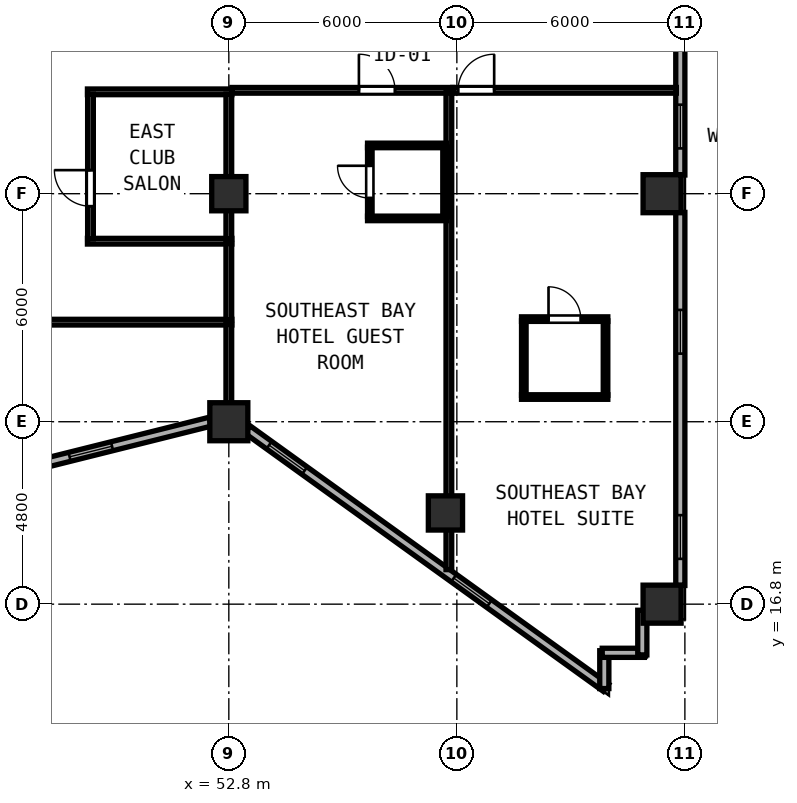
"""IFC4 building model, lengths in metres.
Left out: names, types, materials, properties, quantities, classifications, styles, units other than length and angle.
Written with IfcOpenShell. Run it as: python <this file> out.ifc"""

import sys

from ifc_helpers import new_model, si_unit, direction, frame, frame_2d, origin, origin_2d, place, context, subcontext, project, spatial, rectangle, hollow_rectangle, extrude, element, fill, save


model = new_model("IFC4")
c1 = context("Model", 3, precision=1e-05, world=origin(), true_north=direction((0.0, 1.0)))
c2 = subcontext(c1, "Body", "Model", "MODEL_VIEW")
j1 = project(units=[si_unit("LENGTHUNIT", "METRE"), si_unit("PLANEANGLEUNIT", "RADIAN")], contexts=[c1])
p1 = place(None, origin())
s1 = spatial("IfcSite", under=j1, at=p1, CompositionType="ELEMENT")
p2 = place(p1, origin())
s2 = spatial("IfcBuilding", under=s1, at=p2, CompositionType="ELEMENT")
p3 = place(p2, frame((0.0, 0.0, 98.4)))
s3 = spatial("IfcBuildingStorey", under=s2, at=p3, CompositionType="ELEMENT", Elevation=98.4)
for number, where, z_axis, x_axis in (
    (1, (52.8, 21.6, 0.0), (0.0, 0.0, 1.0), (1.0, 0.0, 0.0)),
    (2, (64.2, 16.8, 0.0), (0.0, 0.0, 1.0), (1.0, 0.0, 0.0)),
    (3, (64.2, 27.6, 0.0), (0.0, 0.0, 1.0), (1.0, 0.0, 0.0)),
):
    element("IfcColumn", number, at=place(p3, frame(where, z_axis=z_axis, x_axis=x_axis)), inside=s3, PredefinedType="COLUMN", context=c2, shape_type="SweptSolid", body=[
        extrude(hollow_rectangle(XDim=1.0, YDim=1.0, WallThickness=0.038, at=origin_2d()), origin(), (0.0, 0.0, 1.0), 3.8),
    ])
for number, where, z_axis, x_axis in (
    (4, (52.8, 27.6, 0.0), (0.0, 0.0, 1.0), (1.0, 0.0, 0.0)),
    (5, (58.5, 19.2, 0.0), (0.0, 0.0, 1.0), (1.0, 0.0, 0.0)),
):
    element("IfcColumn", number, at=place(p3, frame(where, z_axis=z_axis, x_axis=x_axis)), inside=s3, PredefinedType="COLUMN", context=c2, shape_type="SweptSolid", body=[
        extrude(hollow_rectangle(XDim=0.9, YDim=0.9, WallThickness=0.034, at=origin_2d()), origin(), (0.0, 0.0, 1.0), 3.8),
    ])
p4 = place(p3, frame((47.932, 20.507, 0.0), z_axis=(0.0, 0.0, 1.0), x_axis=(0.970145683738, 0.242522890311, 0.0)))
e6 = element("IfcWall", 6, at=p4, inside=s3, PredefinedType="SOLIDWALL", context=c2, shape_type="SweptSolid", body=[
    extrude(rectangle(XDim=4.511, YDim=0.24, at=frame_2d((2.255, 0.0))), origin(), (0.0, 0.0, 1.0), 3.145),
])
p5 = place(p4, frame((0.7, 0.0, 0.85)))
e7 = element("IfcOpeningElement", 7, at=p5, cuts=e6, PredefinedType="OPENING", context=c2, shape_type="SweptSolid", body=[
    extrude(rectangle(XDim=1.15, YDim=1.8, at=frame_2d((0.575, 0.9))), frame((0.0, 0.13, 0.0), z_axis=(0.0, -1.0, 0.0), x_axis=(1.0, 0.0, 0.0)), (0.0, 0.0, 1.0), 0.26),
])
p6 = place(p3, frame((53.292, 21.394, 0.0), z_axis=(0.0, 0.0, 1.0), x_axis=(0.811543504691, -0.584291998913, 0.0)))
e8 = element("IfcWall", 8, at=p6, inside=s3, PredefinedType="SOLIDWALL", context=c2, shape_type="SweptSolid", body=[
    extrude(rectangle(XDim=11.623, YDim=0.24, at=frame_2d((5.812, 0.0))), origin(), (0.0, 0.0, 1.0), 3.145),
])
p7 = place(p6, frame((0.7, 0.0, 0.85)))
e9 = element("IfcOpeningElement", 9, at=p7, cuts=e8, PredefinedType="OPENING", context=c2, shape_type="SweptSolid", body=[
    extrude(rectangle(XDim=1.15, YDim=1.8, at=frame_2d((0.575, 0.9))), frame((0.0, 0.13, 0.0), z_axis=(0.0, -1.0, 0.0), x_axis=(1.0, 0.0, 0.0)), (0.0, 0.0, 1.0), 0.26),
])
p8 = place(p6, frame((6.688, 0.0, 0.85)))
e10 = element("IfcOpeningElement", 10, at=p8, cuts=e8, PredefinedType="OPENING", context=c2, shape_type="SweptSolid", body=[
    extrude(rectangle(XDim=1.15, YDim=1.8, at=frame_2d((0.575, 0.9))), frame((0.0, 0.13, 0.0), z_axis=(0.0, -1.0, 0.0), x_axis=(1.0, 0.0, 0.0)), (0.0, 0.0, 1.0), 0.26),
])
p9 = place(p3, frame((62.68, 14.579, 0.0), z_axis=(0.0, 0.0, 1.0), x_axis=(0.0, 1.0, 0.0)))
e11 = element("IfcWall", 11, at=p9, inside=s3, PredefinedType="SOLIDWALL", context=c2, shape_type="SweptSolid", body=[
    extrude(rectangle(XDim=0.996, YDim=0.24, at=frame_2d((0.498, 0.0))), origin(), (0.0, 0.0, 1.0), 3.6),
])
p10 = place(p3, frame((62.625, 15.52, 0.0), z_axis=(0.0, 0.0, 1.0), x_axis=(1.0, 0.0, 0.0)))
e12 = element("IfcWall", 12, at=p10, inside=s3, PredefinedType="SOLIDWALL", context=c2, shape_type="SweptSolid", body=[
    extrude(rectangle(XDim=1.11, YDim=0.24, at=frame_2d((0.555, 0.0))), origin(), (0.0, 0.0, 1.0), 3.6),
])
p11 = place(p3, frame((63.68, 15.465, 0.0), z_axis=(0.0, 0.0, 1.0), x_axis=(0.0, 1.0, 0.0)))
e13 = element("IfcWall", 13, at=p11, inside=s3, PredefinedType="SOLIDWALL", context=c2, shape_type="SweptSolid", body=[
    extrude(rectangle(XDim=1.175, YDim=0.24, at=frame_2d((0.587, 0.0))), origin(), (0.0, 0.0, 1.0), 3.6),
])
p12 = place(p3, frame((64.68, 17.292, 0.0), z_axis=(0.0, 0.0, 1.0), x_axis=(0.0, 1.0, 0.0)))
e14 = element("IfcWall", 14, at=p12, inside=s3, PredefinedType="SOLIDWALL", context=c2, shape_type="SweptSolid", body=[
    extrude(rectangle(XDim=9.816, YDim=0.24, at=frame_2d((4.908, 0.0))), origin(), (0.0, 0.0, 1.0), 3.6),
])
p13 = place(p12, frame((0.7, 0.0, 0.85)))
e15 = element("IfcOpeningElement", 15, at=p13, cuts=e14, PredefinedType="OPENING", context=c2, shape_type="SweptSolid", body=[
    extrude(rectangle(XDim=1.15, YDim=1.8, at=frame_2d((0.575, 0.9))), frame((0.0, 0.13, 0.0), z_axis=(0.0, -1.0, 0.0), x_axis=(1.0, 0.0, 0.0)), (0.0, 0.0, 1.0), 0.26),
])
p14 = place(p12, frame((6.1, 0.0, 0.85)))
e16 = element("IfcOpeningElement", 16, at=p14, cuts=e14, PredefinedType="OPENING", context=c2, shape_type="SweptSolid", body=[
    extrude(rectangle(XDim=1.15, YDim=1.8, at=frame_2d((0.575, 0.9))), frame((0.0, 0.13, 0.0), z_axis=(0.0, -1.0, 0.0), x_axis=(1.0, 0.0, 0.0)), (0.0, 0.0, 1.0), 0.26),
])
p15 = place(p3, frame((64.68, 28.092, 0.0), z_axis=(0.0, 0.0, 1.0), x_axis=(0.0, 1.0, 0.0)))
e17 = element("IfcWall", 17, at=p15, inside=s3, PredefinedType="SOLIDWALL", context=c2, shape_type="SweptSolid", body=[
    extrude(rectangle(XDim=9.443, YDim=0.24, at=frame_2d((4.721, 0.0))), origin(), (0.0, 0.0, 1.0), 3.6),
])
p16 = place(p15, frame((0.7, 0.0, 0.85)))
e18 = element("IfcOpeningElement", 18, at=p16, cuts=e17, PredefinedType="OPENING", context=c2, shape_type="SweptSolid", body=[
    extrude(rectangle(XDim=1.15, YDim=1.8, at=frame_2d((0.575, 0.9))), frame((0.0, 0.13, 0.0), z_axis=(0.0, -1.0, 0.0), x_axis=(1.0, 0.0, 0.0)), (0.0, 0.0, 1.0), 0.26),
])
p17 = place(p15, frame((6.1, 0.0, 0.85)))
e19 = element("IfcOpeningElement", 19, at=p17, cuts=e17, PredefinedType="OPENING", context=c2, shape_type="SweptSolid", body=[
    extrude(rectangle(XDim=1.15, YDim=1.8, at=frame_2d((0.575, 0.9))), frame((0.0, 0.13, 0.0), z_axis=(0.0, -1.0, 0.0), x_axis=(1.0, 0.0, 0.0)), (0.0, 0.0, 1.0), 0.26),
])
for number, where, z_axis, x_axis in (
    (20, (49.08, 30.28, 0.0), (0.0, 0.0, 1.0), (1.0, 0.0, 0.0)),
    (21, (49.08, 26.35, 0.0), (0.0, 0.0, 1.0), (1.0, 0.0, 0.0)),
):
    element("IfcWall", number, at=place(p3, frame(where, z_axis=z_axis, x_axis=x_axis)), inside=s3, PredefinedType="PARTITIONING", context=c2, shape_type="SweptSolid", body=[
        extrude(rectangle(XDim=3.8, YDim=0.15, at=frame_2d((1.9, 0.0))), origin(), (0.0, 0.0, 1.0), 3.6),
    ])
p18 = place(p3, frame((49.16, 26.41, 0.0), z_axis=(0.0, 0.0, 1.0), x_axis=(0.0, 1.0, 0.0)))
e22 = element("IfcWall", 22, at=p18, inside=s3, PredefinedType="PARTITIONING", context=c2, shape_type="SweptSolid", body=[
    extrude(rectangle(XDim=3.81, YDim=0.15, at=frame_2d((1.905, 0.0))), origin(), (0.0, 0.0, 1.0), 3.6),
])
p19 = place(p18, frame((0.86, 0.0, 0.0)))
e23 = element("IfcOpeningElement", 23, at=p19, cuts=e22, PredefinedType="OPENING", context=c2, shape_type="SweptSolid", body=[
    extrude(rectangle(XDim=0.95, YDim=2.12, at=frame_2d((0.475, 1.06))), frame((0.0, 0.085, 0.0), z_axis=(0.0, -1.0, 0.0), x_axis=(1.0, 0.0, 0.0)), (0.0, 0.0, 1.0), 0.17),
])
p20 = place(p3, frame((52.8, 26.41, 0.0), z_axis=(0.0, 0.0, 1.0), x_axis=(0.0, 1.0, 0.0)))
e24 = element("IfcWall", 24, at=p20, inside=s3, PredefinedType="PARTITIONING", context=c2, shape_type="SweptSolid", body=[
    extrude(rectangle(XDim=3.81, YDim=0.15, at=frame_2d((1.905, 0.0))), origin(), (0.0, 0.0, 1.0), 3.145),
])
p21 = place(p3, frame((45.682, 24.22, 0.0), z_axis=(0.0, 0.0, 1.0), x_axis=(1.0, 0.0, 0.0)))
e25 = element("IfcWall", 25, at=p21, inside=s3, PredefinedType="PARTITIONING", context=c2, shape_type="SweptSolid", body=[
    extrude(rectangle(XDim=7.198, YDim=0.15, at=frame_2d((3.599, 0.0))), origin(), (0.0, 0.0, 1.0), 3.6),
])
p22 = place(p21, frame((2.143, 0.0, 0.0), z_axis=(0.0, 0.0, 1.0), x_axis=(-1.0, 0.0, 0.0)))
e26 = element("IfcOpeningElement", 26, at=p22, cuts=e25, PredefinedType="OPENING", context=c2, shape_type="SweptSolid", body=[
    extrude(rectangle(XDim=0.95, YDim=2.12, at=frame_2d((0.475, 1.06))), frame((0.0, 0.085, 0.0), z_axis=(0.0, -1.0, 0.0), x_axis=(1.0, 0.0, 0.0)), (0.0, 0.0, 1.0), 0.17),
])
p23 = place(p3, frame((52.8, 21.819, 0.0), z_axis=(0.0, 0.0, 1.0), x_axis=(0.0, 1.0, 0.0)))
e27 = element("IfcWall", 27, at=p23, inside=s3, PredefinedType="PARTITIONING", context=c2, shape_type="SweptSolid", body=[
    extrude(rectangle(XDim=2.341, YDim=0.15, at=frame_2d((1.171, 0.0))), origin(), (0.0, 0.0, 1.0), 3.145),
])
p24 = place(p3, frame((52.882, 30.32, 0.0), z_axis=(0.0, 0.0, 1.0), x_axis=(1.0, 0.0, 0.0)))
e28 = element("IfcWall", 28, at=p24, inside=s3, PredefinedType="PARTITIONING", context=c2, shape_type="SweptSolid", body=[
    extrude(rectangle(XDim=5.808, YDim=0.15, at=frame_2d((2.904, 0.0))), origin(), (0.0, 0.0, 1.0), 3.6),
])
p25 = place(p24, frame((4.291, 0.0, 0.0), z_axis=(0.0, 0.0, 1.0), x_axis=(-1.0, 0.0, 0.0)))
e29 = element("IfcOpeningElement", 29, at=p25, cuts=e28, PredefinedType="OPENING", context=c2, shape_type="SweptSolid", body=[
    extrude(rectangle(XDim=0.95, YDim=2.15, at=frame_2d((0.475, 1.075))), frame((0.0, 0.085, 0.0), z_axis=(0.0, -1.0, 0.0), x_axis=(1.0, 0.0, 0.0)), (0.0, 0.0, 1.0), 0.17),
])
p26 = place(p3, frame((52.8, 24.28, 0.0), z_axis=(0.0, 0.0, 1.0), x_axis=(0.0, 1.0, 0.0)))
e30 = element("IfcWall", 30, at=p26, inside=s3, PredefinedType="PARTITIONING", context=c2, shape_type="SweptSolid", body=[
    extrude(rectangle(XDim=2.01, YDim=0.15, at=frame_2d((1.005, 0.0))), origin(), (0.0, 0.0, 1.0), 3.145),
])
p27 = place(p3, frame((58.59, 17.708, 0.0), z_axis=(0.0, 0.0, 1.0), x_axis=(0.0, 1.0, 0.0)))
e31 = element("IfcWall", 31, at=p27, inside=s3, PredefinedType="PARTITIONING", context=c2, shape_type="SweptSolid", body=[
    extrude(rectangle(XDim=12.552, YDim=0.15, at=frame_2d((6.276, 0.0))), origin(), (0.0, 0.0, 1.0), 3.6),
])
for number, where, z_axis, x_axis in (
    (32, (56.45, 28.87, 0.0), (0.0, 0.0, 1.0), (1.0, 0.0, 0.0)),
    (33, (56.45, 26.95, 0.0), (0.0, 0.0, 1.0), (1.0, 0.0, 0.0)),
):
    element("IfcWall", number, at=place(p3, frame(where, z_axis=z_axis, x_axis=x_axis)), inside=s3, PredefinedType="PARTITIONING", context=c2, shape_type="SweptSolid", body=[
        extrude(rectangle(XDim=2.08, YDim=0.12, at=frame_2d((1.04, 0.0))), origin(), (0.0, 0.0, 1.0), 3.6),
    ])
p28 = place(p3, frame((56.51, 26.995, 0.0), z_axis=(0.0, 0.0, 1.0), x_axis=(0.0, 1.0, 0.0)))
e34 = element("IfcWall", 34, at=p28, inside=s3, PredefinedType="PARTITIONING", context=c2, shape_type="SweptSolid", body=[
    extrude(rectangle(XDim=1.83, YDim=0.12, at=frame_2d((0.915, 0.0))), origin(), (0.0, 0.0, 1.0), 3.6),
])
p29 = place(p28, frame((1.34, 0.0, 0.0), z_axis=(0.0, 0.0, 1.0), x_axis=(-1.0, 0.0, 0.0)))
e35 = element("IfcOpeningElement", 35, at=p29, cuts=e34, PredefinedType="OPENING", context=c2, shape_type="SweptSolid", body=[
    extrude(rectangle(XDim=0.85, YDim=2.1, at=frame_2d((0.425, 1.05))), frame((0.0, 0.07, 0.0), z_axis=(0.0, -1.0, 0.0), x_axis=(1.0, 0.0, 0.0)), (0.0, 0.0, 1.0), 0.14),
])
p30 = place(p3, frame((58.49, 26.995, 0.0), z_axis=(0.0, 0.0, 1.0), x_axis=(0.0, 1.0, 0.0)))
e36 = element("IfcWall", 36, at=p30, inside=s3, PredefinedType="PARTITIONING", context=c2, shape_type="SweptSolid", body=[
    extrude(rectangle(XDim=1.83, YDim=0.12, at=frame_2d((0.915, 0.0))), origin(), (0.0, 0.0, 1.0), 3.6),
])
p31 = place(p3, frame((58.692, 30.32, 0.0), z_axis=(0.0, 0.0, 1.0), x_axis=(1.0, 0.0, 0.0)))
e37 = element("IfcWall", 37, at=p31, inside=s3, PredefinedType="PARTITIONING", context=c2, shape_type="SweptSolid", body=[
    extrude(rectangle(XDim=5.883, YDim=0.15, at=frame_2d((2.941, 0.0))), origin(), (0.0, 0.0, 1.0), 3.6),
])
p32 = place(p31, frame((1.09, 0.0, 0.0), z_axis=(0.0, 0.0, 1.0), x_axis=(-1.0, 0.0, 0.0)))
e38 = element("IfcOpeningElement", 38, at=p32, cuts=e37, PredefinedType="OPENING", context=c2, shape_type="SweptSolid", body=[
    extrude(rectangle(XDim=0.95, YDim=2.18, at=frame_2d((0.475, 1.09))), frame((0.0, 0.085, 0.0), z_axis=(0.0, -1.0, 0.0), x_axis=(1.0, 0.0, 0.0)), (0.0, 0.0, 1.0), 0.17),
])
p33 = place(p3, frame((60.502, 24.3, 0.0), z_axis=(0.0, 0.0, 1.0), x_axis=(1.0, 0.0, 0.0)))
e39 = element("IfcWall", 39, at=p33, inside=s3, PredefinedType="PARTITIONING", context=c2, shape_type="SweptSolid", body=[
    extrude(rectangle(XDim=2.27, YDim=0.12, at=frame_2d((1.135, 0.0))), origin(), (0.0, 0.0, 1.0), 3.6),
])
p34 = place(p33, frame((1.56, 0.0, 0.0), z_axis=(0.0, 0.0, 1.0), x_axis=(-1.0, 0.0, 0.0)))
e40 = element("IfcOpeningElement", 40, at=p34, cuts=e39, PredefinedType="OPENING", context=c2, shape_type="SweptSolid", body=[
    extrude(rectangle(XDim=0.85, YDim=2.1, at=frame_2d((0.425, 1.05))), frame((0.0, 0.07, 0.0), z_axis=(0.0, -1.0, 0.0), x_axis=(1.0, 0.0, 0.0)), (0.0, 0.0, 1.0), 0.14),
])
p35 = place(p3, frame((60.502, 22.25, 0.0), z_axis=(0.0, 0.0, 1.0), x_axis=(1.0, 0.0, 0.0)))
e41 = element("IfcWall", 41, at=p35, inside=s3, PredefinedType="PARTITIONING", context=c2, shape_type="SweptSolid", body=[
    extrude(rectangle(XDim=2.27, YDim=0.12, at=frame_2d((1.135, 0.0))), origin(), (0.0, 0.0, 1.0), 3.6),
])
for number, where, z_axis, x_axis in (
    (42, (60.562, 22.295, 0.0), (0.0, 0.0, 1.0), (0.0, 1.0, 0.0)),
    (43, (62.712, 22.295, 0.0), (0.0, 0.0, 1.0), (0.0, 1.0, 0.0)),
):
    element("IfcWall", number, at=place(p3, frame(where, z_axis=z_axis, x_axis=x_axis)), inside=s3, PredefinedType="PARTITIONING", context=c2, shape_type="SweptSolid", body=[
        extrude(rectangle(XDim=1.96, YDim=0.12, at=frame_2d((0.98, 0.0))), origin(), (0.0, 0.0, 1.0), 3.6),
    ])
p36 = place(p5, origin())
e44 = element("IfcWindow", 44, at=p36, inside=s3, PartitioningType="SINGLE_PANEL", PredefinedType="WINDOW", context=c2, shape_type="SweptSolid", body=[
    extrude(rectangle(XDim=1.15, YDim=1.8, at=frame_2d((0.575, 0.9))), frame((0.0, 0.03, 0.0), z_axis=(0.0, -1.0, 0.0), x_axis=(1.0, 0.0, 0.0)), (0.0, 0.0, 1.0), 0.06),
])
fill(e7, e44)
p37 = place(p7, origin())
e45 = element("IfcWindow", 45, at=p37, inside=s3, PartitioningType="SINGLE_PANEL", PredefinedType="WINDOW", context=c2, shape_type="SweptSolid", body=[
    extrude(rectangle(XDim=1.15, YDim=1.8, at=frame_2d((0.575, 0.9))), frame((0.0, 0.03, 0.0), z_axis=(0.0, -1.0, 0.0), x_axis=(1.0, 0.0, 0.0)), (0.0, 0.0, 1.0), 0.06),
])
fill(e9, e45)
p38 = place(p8, origin())
e46 = element("IfcWindow", 46, at=p38, inside=s3, PartitioningType="SINGLE_PANEL", PredefinedType="WINDOW", context=c2, shape_type="SweptSolid", body=[
    extrude(rectangle(XDim=1.15, YDim=1.8, at=frame_2d((0.575, 0.9))), frame((0.0, 0.03, 0.0), z_axis=(0.0, -1.0, 0.0), x_axis=(1.0, 0.0, 0.0)), (0.0, 0.0, 1.0), 0.06),
])
fill(e10, e46)
p39 = place(p13, origin())
e47 = element("IfcWindow", 47, at=p39, inside=s3, PartitioningType="SINGLE_PANEL", PredefinedType="WINDOW", context=c2, shape_type="SweptSolid", body=[
    extrude(rectangle(XDim=1.15, YDim=1.8, at=frame_2d((0.575, 0.9))), frame((0.0, 0.03, 0.0), z_axis=(0.0, -1.0, 0.0), x_axis=(1.0, 0.0, 0.0)), (0.0, 0.0, 1.0), 0.06),
])
fill(e15, e47)
p40 = place(p14, origin())
e48 = element("IfcWindow", 48, at=p40, inside=s3, PartitioningType="SINGLE_PANEL", PredefinedType="WINDOW", context=c2, shape_type="SweptSolid", body=[
    extrude(rectangle(XDim=1.15, YDim=1.8, at=frame_2d((0.575, 0.9))), frame((0.0, 0.03, 0.0), z_axis=(0.0, -1.0, 0.0), x_axis=(1.0, 0.0, 0.0)), (0.0, 0.0, 1.0), 0.06),
])
fill(e16, e48)
p41 = place(p16, origin())
e49 = element("IfcWindow", 49, at=p41, inside=s3, PartitioningType="SINGLE_PANEL", PredefinedType="WINDOW", context=c2, shape_type="SweptSolid", body=[
    extrude(rectangle(XDim=1.15, YDim=1.8, at=frame_2d((0.575, 0.9))), frame((0.0, 0.03, 0.0), z_axis=(0.0, -1.0, 0.0), x_axis=(1.0, 0.0, 0.0)), (0.0, 0.0, 1.0), 0.06),
])
fill(e18, e49)
p42 = place(p19, origin())
e50 = element("IfcDoor", 50, at=p42, inside=s3, OperationType="SINGLE_SWING_RIGHT", PredefinedType="DOOR", context=c2, shape_type="SweptSolid", body=[
    extrude(rectangle(XDim=0.95, YDim=2.12, at=frame_2d((0.475, 1.06))), frame((0.0, 0.025, 0.0), z_axis=(0.0, -1.0, 0.0), x_axis=(1.0, 0.0, 0.0)), (0.0, 0.0, 1.0), 0.05),
])
fill(e23, e50)
p43 = place(p25, origin())
e51 = element("IfcDoor", 51, at=p43, inside=s3, OperationType="SINGLE_SWING_RIGHT", PredefinedType="DOOR", context=c2, shape_type="SweptSolid", body=[
    extrude(rectangle(XDim=0.95, YDim=2.15, at=frame_2d((0.475, 1.075))), frame((0.0, 0.025, 0.0), z_axis=(0.0, -1.0, 0.0), x_axis=(1.0, 0.0, 0.0)), (0.0, 0.0, 1.0), 0.05),
])
fill(e29, e51)
p44 = place(p29, origin())
e52 = element("IfcDoor", 52, at=p44, inside=s3, OperationType="SINGLE_SWING_LEFT", PredefinedType="DOOR", context=c2, shape_type="SweptSolid", body=[
    extrude(rectangle(XDim=0.85, YDim=2.1, at=frame_2d((0.425, 1.05))), frame((0.0, 0.025, 0.0), z_axis=(0.0, -1.0, 0.0), x_axis=(1.0, 0.0, 0.0)), (0.0, 0.0, 1.0), 0.05),
])
fill(e35, e52)
p45 = place(p32, origin())
e53 = element("IfcDoor", 53, at=p45, inside=s3, OperationType="SINGLE_SWING_LEFT", PredefinedType="DOOR", context=c2, shape_type="SweptSolid", body=[
    extrude(rectangle(XDim=0.95, YDim=2.18, at=frame_2d((0.475, 1.09))), frame((0.0, 0.025, 0.0), z_axis=(0.0, -1.0, 0.0), x_axis=(1.0, 0.0, 0.0)), (0.0, 0.0, 1.0), 0.05),
])
fill(e38, e53)
p46 = place(p34, origin())
e54 = element("IfcDoor", 54, at=p46, inside=s3, OperationType="SINGLE_SWING_RIGHT", PredefinedType="DOOR", context=c2, shape_type="SweptSolid", body=[
    extrude(rectangle(XDim=0.85, YDim=2.1, at=frame_2d((0.425, 1.05))), frame((0.0, 0.025, 0.0), z_axis=(0.0, -1.0, 0.0), x_axis=(1.0, 0.0, 0.0)), (0.0, 0.0, 1.0), 0.05),
])
fill(e40, e54)
save(model, sys.argv[1])
